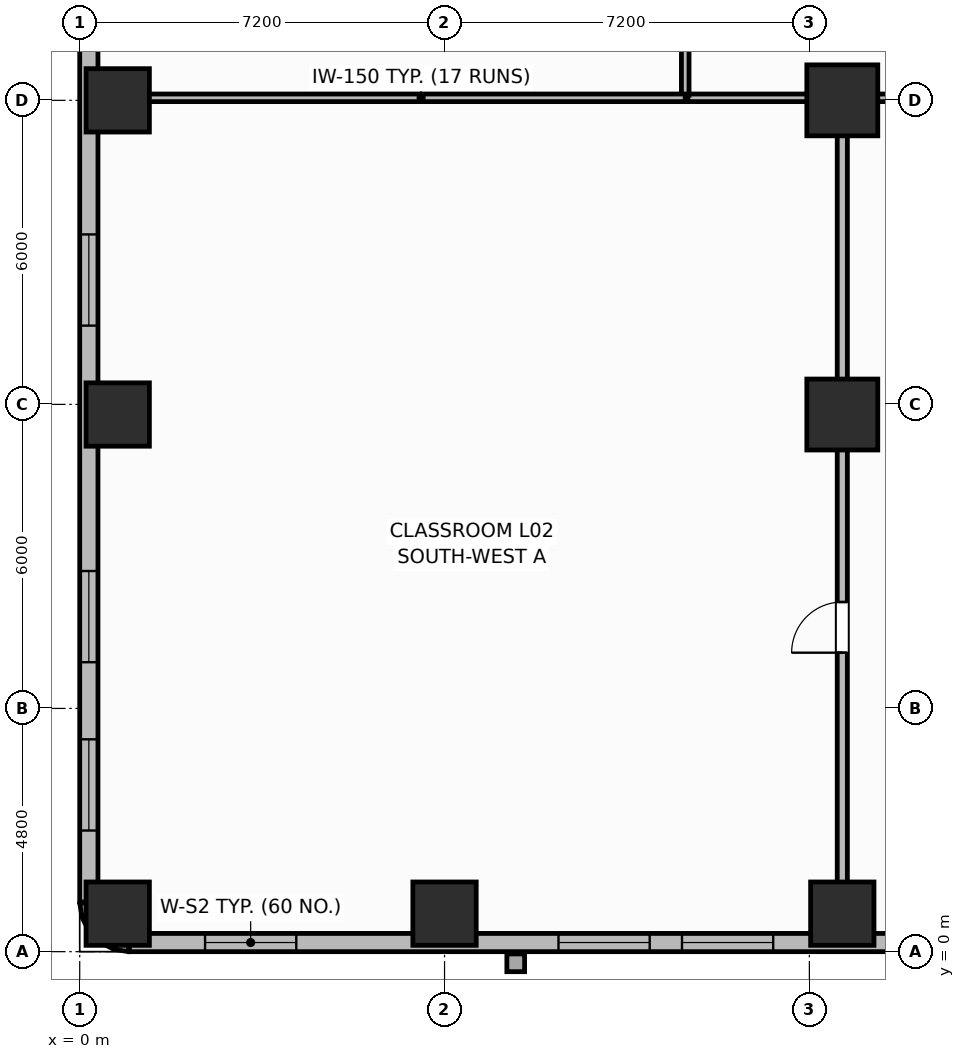
"""IFC4 building model, lengths in metres.
Left out: names, types, materials, properties, quantities, classifications, styles, units other than length and angle.
Written with IfcOpenShell. Run it as: python <this file> out.ifc"""

import sys

from ifc_helpers import new_model, si_unit, direction, frame, frame_2d, origin, origin_2d, place, context, subcontext, project, spatial, rectangle, extrude, element, fill, save


model = new_model("IFC4")
c1 = context("Model", 3, precision=1e-05, world=origin(), true_north=direction((0.0, 1.0)))
c2 = subcontext(c1, "Body", "Model", "MODEL_VIEW")
j1 = project(units=[si_unit("LENGTHUNIT", "METRE"), si_unit("PLANEANGLEUNIT", "RADIAN")], contexts=[c1])
p1 = place(None, origin())
s1 = spatial("IfcSite", under=j1, at=p1, CompositionType="ELEMENT")
p2 = place(p1, origin())
s2 = spatial("IfcBuilding", under=s1, at=p2, CompositionType="ELEMENT")
p3 = place(p2, frame((0.0, 0.0, 11.1)))
s3 = spatial("IfcBuildingStorey", under=s2, at=p3, CompositionType="ELEMENT", Elevation=11.1)
for number, where, z_axis, x_axis in (
    (1, (0.75, 0.75, 0.0), (0.0, 0.0, 1.0), (1.0, 0.0, 0.0)),
    (2, (0.75, 10.6, 0.0), (0.0, 0.0, 1.0), (1.0, 0.0, 0.0)),
    (3, (0.75, 16.8, 0.0), (0.0, 0.0, 1.0), (1.0, 0.0, 0.0)),
    (4, (7.2, 0.75, 0.0), (0.0, 0.0, 1.0), (1.0, 0.0, 0.0)),
    (5, (15.05, 0.75, 0.0), (0.0, 0.0, 1.0), (1.0, 0.0, 0.0)),
):
    element("IfcColumn", number, at=place(p3, frame(where, z_axis=z_axis, x_axis=x_axis)), inside=s3, PredefinedType="COLUMN", context=c2, shape_type="SweptSolid", body=[
        extrude(rectangle(XDim=1.25, YDim=1.25, at=origin_2d()), origin(), (0.0, 0.0, 1.0), 4.5),
    ])
for number, where, z_axis, x_axis in (
    (6, (15.05, 10.6, 0.0), (0.0, 0.0, 1.0), (1.0, 0.0, 0.0)),
    (7, (15.05, 16.8, 0.0), (0.0, 0.0, 1.0), (1.0, 0.0, 0.0)),
):
    element("IfcColumn", number, at=place(p3, frame(where, z_axis=z_axis, x_axis=x_axis)), inside=s3, PredefinedType="COLUMN", context=c2, shape_type="SweptSolid", body=[
        extrude(rectangle(XDim=1.4, YDim=1.4, at=origin_2d()), origin(), (0.0, 0.0, 1.0), 4.5),
    ])
for number, where, z_axis, x_axis in (
    (8, (0.18, 0.98, 0.0), (0.0, 0.0, 1.0), (0.157, -0.988, 0.0)),
    (9, (0.219, 0.733, 0.0), (0.0, 0.0, 1.0), (0.453, -0.891, 0.0)),
    (10, (0.333, 0.51, 0.0), (0.0, 0.0, 1.0), (0.707, -0.707, 0.0)),
    (11, (0.51, 0.333, 0.0), (0.0, 0.0, 1.0), (0.891, -0.453, 0.0)),
    (12, (0.733, 0.219, 0.0), (0.0, 0.0, 1.0), (0.988, -0.157, 0.0)),
):
    element("IfcWall", number, at=place(p3, frame(where, z_axis=z_axis, x_axis=x_axis)), inside=s3, PredefinedType="SOLIDWALL", context=c2, shape_type="SweptSolid", body=[
        extrude(rectangle(XDim=0.25, YDim=0.36, at=frame_2d((0.125, 0.0))), origin(), (0.0, 0.0, 1.0), 3.48),
    ])
p4 = place(p3, frame((0.98, 0.18, 0.0), z_axis=(0.0, 0.0, 1.0), x_axis=(1.0, 0.0, 0.0)))
e13 = element("IfcWall", 13, at=p4, inside=s3, PredefinedType="SOLIDWALL", context=c2, shape_type="SweptSolid", body=[
    extrude(rectangle(XDim=15.25, YDim=0.36, at=frame_2d((7.625, 0.0))), origin(), (0.0, 0.0, 1.0), 3.48),
])
p5 = place(p4, frame((1.494, 0.0, 0.9)))
e14 = element("IfcOpeningElement", 14, at=p5, cuts=e13, PredefinedType="OPENING", context=c2, shape_type="SweptSolid", body=[
    extrude(rectangle(XDim=1.8, YDim=2.1, at=frame_2d((0.9, 1.05))), frame((0.0, 0.19, 0.0), z_axis=(0.0, -1.0, 0.0), x_axis=(1.0, 0.0, 0.0)), (0.0, 0.0, 1.0), 0.38),
])
p6 = place(p4, frame((8.469, 0.0, 0.9)))
e15 = element("IfcOpeningElement", 15, at=p6, cuts=e13, PredefinedType="OPENING", context=c2, shape_type="SweptSolid", body=[
    extrude(rectangle(XDim=1.8, YDim=2.1, at=frame_2d((0.9, 1.05))), frame((0.0, 0.19, 0.0), z_axis=(0.0, -1.0, 0.0), x_axis=(1.0, 0.0, 0.0)), (0.0, 0.0, 1.0), 0.38),
])
p7 = place(p4, frame((10.906, 0.0, 0.9)))
e16 = element("IfcOpeningElement", 16, at=p7, cuts=e13, PredefinedType="OPENING", context=c2, shape_type="SweptSolid", body=[
    extrude(rectangle(XDim=1.8, YDim=2.1, at=frame_2d((0.9, 1.05))), frame((0.0, 0.19, 0.0), z_axis=(0.0, -1.0, 0.0), x_axis=(1.0, 0.0, 0.0)), (0.0, 0.0, 1.0), 0.38),
])
p8 = place(p3, frame((0.18, 55.42, 0.0), z_axis=(0.0, 0.0, 1.0), x_axis=(0.0, -1.0, 0.0)))
e17 = element("IfcWall", 17, at=p8, inside=s3, PredefinedType="SOLIDWALL", context=c2, shape_type="SweptSolid", body=[
    extrude(rectangle(XDim=54.44, YDim=0.36, at=frame_2d((27.22, 0.0))), origin(), (0.0, 0.0, 1.0), 3.48),
])
p9 = place(p8, frame((1.411, 0.0, 0.9)))
e18 = element("IfcOpeningElement", 18, at=p9, cuts=e17, PredefinedType="OPENING", context=c2, shape_type="SweptSolid", body=[
    extrude(rectangle(XDim=1.8, YDim=2.1, at=frame_2d((0.9, 1.05))), frame((0.0, 0.19, 0.0), z_axis=(0.0, -1.0, 0.0), x_axis=(1.0, 0.0, 0.0)), (0.0, 0.0, 1.0), 0.38),
])
p10 = place(p8, frame((4.732, 0.0, 0.9)))
e19 = element("IfcOpeningElement", 19, at=p10, cuts=e17, PredefinedType="OPENING", context=c2, shape_type="SweptSolid", body=[
    extrude(rectangle(XDim=1.8, YDim=2.1, at=frame_2d((0.9, 1.05))), frame((0.0, 0.19, 0.0), z_axis=(0.0, -1.0, 0.0), x_axis=(1.0, 0.0, 0.0)), (0.0, 0.0, 1.0), 0.38),
])
p11 = place(p8, frame((11.375, 0.0, 0.9)))
e20 = element("IfcOpeningElement", 20, at=p11, cuts=e17, PredefinedType="OPENING", context=c2, shape_type="SweptSolid", body=[
    extrude(rectangle(XDim=1.8, YDim=2.1, at=frame_2d((0.9, 1.05))), frame((0.0, 0.19, 0.0), z_axis=(0.0, -1.0, 0.0), x_axis=(1.0, 0.0, 0.0)), (0.0, 0.0, 1.0), 0.38),
])
p12 = place(p8, frame((18.017, 0.0, 0.9)))
e21 = element("IfcOpeningElement", 21, at=p12, cuts=e17, PredefinedType="OPENING", context=c2, shape_type="SweptSolid", body=[
    extrude(rectangle(XDim=1.8, YDim=2.1, at=frame_2d((0.9, 1.05))), frame((0.0, 0.19, 0.0), z_axis=(0.0, -1.0, 0.0), x_axis=(1.0, 0.0, 0.0)), (0.0, 0.0, 1.0), 0.38),
])
p13 = place(p8, frame((21.338, 0.0, 0.9)))
e22 = element("IfcOpeningElement", 22, at=p13, cuts=e17, PredefinedType="OPENING", context=c2, shape_type="SweptSolid", body=[
    extrude(rectangle(XDim=1.8, YDim=2.1, at=frame_2d((0.9, 1.05))), frame((0.0, 0.19, 0.0), z_axis=(0.0, -1.0, 0.0), x_axis=(1.0, 0.0, 0.0)), (0.0, 0.0, 1.0), 0.38),
])
p14 = place(p8, frame((23.959, 0.0, 0.9)))
e23 = element("IfcOpeningElement", 23, at=p14, cuts=e17, PredefinedType="OPENING", context=c2, shape_type="SweptSolid", body=[
    extrude(rectangle(XDim=1.8, YDim=2.1, at=frame_2d((0.9, 1.05))), frame((0.0, 0.19, 0.0), z_axis=(0.0, -1.0, 0.0), x_axis=(1.0, 0.0, 0.0)), (0.0, 0.0, 1.0), 0.38),
])
p15 = place(p8, frame((28.681, 0.0, 0.9)))
e24 = element("IfcOpeningElement", 24, at=p15, cuts=e17, PredefinedType="OPENING", context=c2, shape_type="SweptSolid", body=[
    extrude(rectangle(XDim=1.8, YDim=2.1, at=frame_2d((0.9, 1.05))), frame((0.0, 0.19, 0.0), z_axis=(0.0, -1.0, 0.0), x_axis=(1.0, 0.0, 0.0)), (0.0, 0.0, 1.0), 0.38),
])
p16 = place(p8, frame((31.302, 0.0, 0.9)))
e25 = element("IfcOpeningElement", 25, at=p16, cuts=e17, PredefinedType="OPENING", context=c2, shape_type="SweptSolid", body=[
    extrude(rectangle(XDim=1.8, YDim=2.1, at=frame_2d((0.9, 1.05))), frame((0.0, 0.19, 0.0), z_axis=(0.0, -1.0, 0.0), x_axis=(1.0, 0.0, 0.0)), (0.0, 0.0, 1.0), 0.38),
])
p17 = place(p8, frame((34.623, 0.0, 0.9)))
e26 = element("IfcOpeningElement", 26, at=p17, cuts=e17, PredefinedType="OPENING", context=c2, shape_type="SweptSolid", body=[
    extrude(rectangle(XDim=1.8, YDim=2.1, at=frame_2d((0.9, 1.05))), frame((0.0, 0.19, 0.0), z_axis=(0.0, -1.0, 0.0), x_axis=(1.0, 0.0, 0.0)), (0.0, 0.0, 1.0), 0.38),
])
p18 = place(p8, frame((41.266, 0.0, 0.9)))
e27 = element("IfcOpeningElement", 27, at=p18, cuts=e17, PredefinedType="OPENING", context=c2, shape_type="SweptSolid", body=[
    extrude(rectangle(XDim=1.8, YDim=2.1, at=frame_2d((0.9, 1.05))), frame((0.0, 0.19, 0.0), z_axis=(0.0, -1.0, 0.0), x_axis=(1.0, 0.0, 0.0)), (0.0, 0.0, 1.0), 0.38),
])
p19 = place(p8, frame((47.908, 0.0, 0.9)))
e28 = element("IfcOpeningElement", 28, at=p19, cuts=e17, PredefinedType="OPENING", context=c2, shape_type="SweptSolid", body=[
    extrude(rectangle(XDim=1.8, YDim=2.1, at=frame_2d((0.9, 1.05))), frame((0.0, 0.19, 0.0), z_axis=(0.0, -1.0, 0.0), x_axis=(1.0, 0.0, 0.0)), (0.0, 0.0, 1.0), 0.38),
])
p20 = place(p8, frame((51.229, 0.0, 0.9)))
e29 = element("IfcOpeningElement", 29, at=p20, cuts=e17, PredefinedType="OPENING", context=c2, shape_type="SweptSolid", body=[
    extrude(rectangle(XDim=1.8, YDim=2.1, at=frame_2d((0.9, 1.05))), frame((0.0, 0.19, 0.0), z_axis=(0.0, -1.0, 0.0), x_axis=(1.0, 0.0, 0.0)), (0.0, 0.0, 1.0), 0.38),
])
p21 = place(p3, frame((15.05, 0.4, 0.0), z_axis=(0.0, 0.0, 1.0), x_axis=(0.0, 1.0, 0.0)))
e30 = element("IfcWall", 30, at=p21, inside=s3, PredefinedType="PARTITIONING", context=c2, shape_type="SweptSolid", body=[
    extrude(rectangle(XDim=16.4, YDim=0.2, at=frame_2d((8.2, 0.0))), origin(), (0.0, 0.0, 1.0), 3.42),
])
p22 = place(p21, frame((5.5, 0.0, 0.0)))
e31 = element("IfcOpeningElement", 31, at=p22, cuts=e30, PredefinedType="OPENING", context=c2, shape_type="SweptSolid", body=[
    extrude(rectangle(XDim=1.0, YDim=2.15, at=frame_2d((0.5, 1.075))), frame((0.0, 0.11, 0.0), z_axis=(0.0, -1.0, 0.0), x_axis=(1.0, 0.0, 0.0)), (0.0, 0.0, 1.0), 0.22),
])
p23 = place(p3, frame((12.0, 16.85, 0.0), z_axis=(0.0, 0.0, 1.0), x_axis=(1.0, 0.0, 0.0)))
e32 = element("IfcWall", 32, at=p23, inside=s3, PredefinedType="PARTITIONING", context=c2, shape_type="SweptSolid", body=[
    extrude(rectangle(XDim=13.25, YDim=0.15, at=frame_2d((6.625, 0.0))), origin(), (0.0, 0.0, 1.0), 3.42),
])
p24 = place(p23, frame((7.5, 0.0, 0.0)))
e33 = element("IfcOpeningElement", 33, at=p24, cuts=e32, PredefinedType="OPENING", context=c2, shape_type="SweptSolid", body=[
    extrude(rectangle(XDim=1.0, YDim=2.15, at=frame_2d((0.5, 1.075))), frame((0.0, 0.085, 0.0), z_axis=(0.0, -1.0, 0.0), x_axis=(1.0, 0.0, 0.0)), (0.0, 0.0, 1.0), 0.17),
])
p25 = place(p3, frame((11.95, 16.9, 0.0), z_axis=(0.0, 0.0, 1.0), x_axis=(0.0, 1.0, 0.0)))
e34 = element("IfcWall", 34, at=p25, inside=s3, PredefinedType="PARTITIONING", context=c2, shape_type="SweptSolid", body=[
    extrude(rectangle(XDim=5.65, YDim=0.15, at=frame_2d((2.825, 0.0))), origin(), (0.0, 0.0, 1.0), 3.42),
])
p26 = place(p25, frame((2.1, 0.0, 0.0)))
e35 = element("IfcOpeningElement", 35, at=p26, cuts=e34, PredefinedType="OPENING", context=c2, shape_type="SweptSolid", body=[
    extrude(rectangle(XDim=0.95, YDim=2.1, at=frame_2d((0.475, 1.05))), frame((0.0, 0.085, 0.0), z_axis=(0.0, -1.0, 0.0), x_axis=(1.0, 0.0, 0.0)), (0.0, 0.0, 1.0), 0.17),
])
p27 = place(p3, frame((0.4, 16.85, 0.0), z_axis=(0.0, 0.0, 1.0), x_axis=(1.0, 0.0, 0.0)))
e36 = element("IfcWall", 36, at=p27, inside=s3, PredefinedType="PARTITIONING", context=c2, shape_type="SweptSolid", body=[
    extrude(rectangle(XDim=11.55, YDim=0.15, at=frame_2d((5.775, 0.0))), origin(), (0.0, 0.0, 1.0), 3.42),
])
p28 = place(p5, origin())
e37 = element("IfcWindow", 37, at=p28, inside=s3, PartitioningType="SINGLE_PANEL", PredefinedType="WINDOW", context=c2, shape_type="SweptSolid", body=[
    extrude(rectangle(XDim=1.8, YDim=2.1, at=frame_2d((0.9, 1.05))), frame((0.0, 0.03, 0.0), z_axis=(0.0, -1.0, 0.0), x_axis=(1.0, 0.0, 0.0)), (0.0, 0.0, 1.0), 0.06),
])
fill(e14, e37)
p29 = place(p6, origin())
e38 = element("IfcWindow", 38, at=p29, inside=s3, PartitioningType="SINGLE_PANEL", PredefinedType="WINDOW", context=c2, shape_type="SweptSolid", body=[
    extrude(rectangle(XDim=1.8, YDim=2.1, at=frame_2d((0.9, 1.05))), frame((0.0, 0.03, 0.0), z_axis=(0.0, -1.0, 0.0), x_axis=(1.0, 0.0, 0.0)), (0.0, 0.0, 1.0), 0.06),
])
fill(e15, e38)
p30 = place(p7, origin())
e39 = element("IfcWindow", 39, at=p30, inside=s3, PartitioningType="SINGLE_PANEL", PredefinedType="WINDOW", context=c2, shape_type="SweptSolid", body=[
    extrude(rectangle(XDim=1.8, YDim=2.1, at=frame_2d((0.9, 1.05))), frame((0.0, 0.03, 0.0), z_axis=(0.0, -1.0, 0.0), x_axis=(1.0, 0.0, 0.0)), (0.0, 0.0, 1.0), 0.06),
])
fill(e16, e39)
p31 = place(p18, origin())
e40 = element("IfcWindow", 40, at=p31, inside=s3, PartitioningType="SINGLE_PANEL", PredefinedType="WINDOW", context=c2, shape_type="SweptSolid", body=[
    extrude(rectangle(XDim=1.8, YDim=2.1, at=frame_2d((0.9, 1.05))), frame((0.0, 0.03, 0.0), z_axis=(0.0, -1.0, 0.0), x_axis=(1.0, 0.0, 0.0)), (0.0, 0.0, 1.0), 0.06),
])
fill(e27, e40)
p32 = place(p19, origin())
e41 = element("IfcWindow", 41, at=p32, inside=s3, PartitioningType="SINGLE_PANEL", PredefinedType="WINDOW", context=c2, shape_type="SweptSolid", body=[
    extrude(rectangle(XDim=1.8, YDim=2.1, at=frame_2d((0.9, 1.05))), frame((0.0, 0.03, 0.0), z_axis=(0.0, -1.0, 0.0), x_axis=(1.0, 0.0, 0.0)), (0.0, 0.0, 1.0), 0.06),
])
fill(e28, e41)
p33 = place(p20, origin())
e42 = element("IfcWindow", 42, at=p33, inside=s3, PartitioningType="SINGLE_PANEL", PredefinedType="WINDOW", context=c2, shape_type="SweptSolid", body=[
    extrude(rectangle(XDim=1.8, YDim=2.1, at=frame_2d((0.9, 1.05))), frame((0.0, 0.03, 0.0), z_axis=(0.0, -1.0, 0.0), x_axis=(1.0, 0.0, 0.0)), (0.0, 0.0, 1.0), 0.06),
])
fill(e29, e42)
p34 = place(p22, origin())
e43 = element("IfcDoor", 43, at=p34, inside=s3, OperationType="SINGLE_SWING_LEFT", PredefinedType="DOOR", context=c2, shape_type="SweptSolid", body=[
    extrude(rectangle(XDim=1.0, YDim=2.15, at=frame_2d((0.5, 1.075))), frame((0.0, 0.025, 0.0), z_axis=(0.0, -1.0, 0.0), x_axis=(1.0, 0.0, 0.0)), (0.0, 0.0, 1.0), 0.05),
])
fill(e31, e43)
save(model, sys.argv[1])
